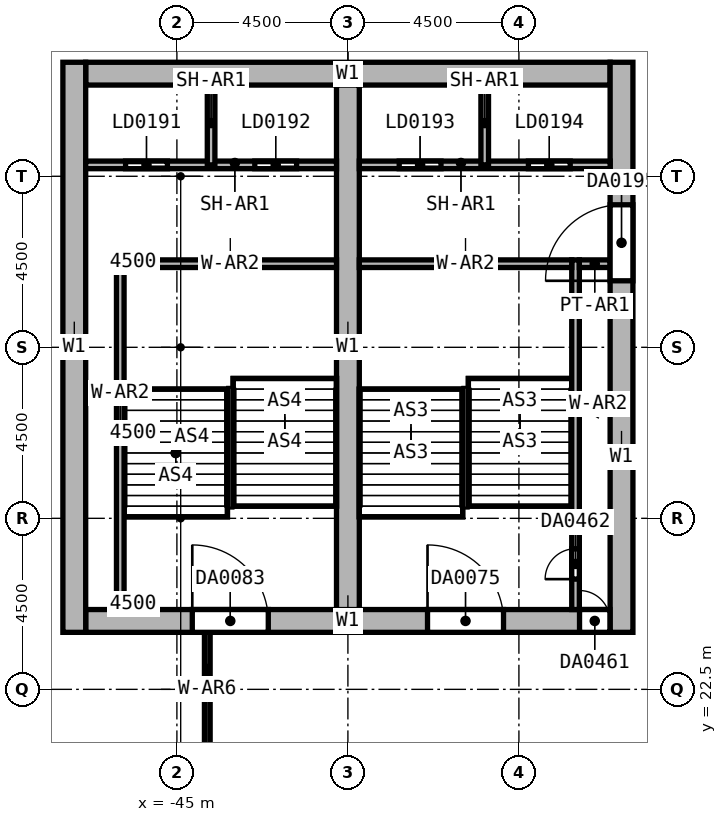
"""IFC4 building model, lengths in metres.
Left out: names, types, materials, properties, quantities, classifications, styles, units other than length and angle.
Written with IfcOpenShell. Run it as: python <this file> out.ifc"""

import sys

from ifc_helpers import new_model, si_unit, direction, frame, frame_2d, origin, place, context, subcontext, project, spatial, rectangle, extrude, element, fill, save


model = new_model("IFC4")
c1 = context("Model", 3, precision=1e-05, world=origin(), true_north=direction((0.0, 1.0)))
c2 = subcontext(c1, "Body", "Model", "MODEL_VIEW")
j1 = project(units=[si_unit("LENGTHUNIT", "METRE"), si_unit("PLANEANGLEUNIT", "RADIAN")], contexts=[c1])
p1 = place(None, origin())
s1 = spatial("IfcSite", under=j1, at=p1, CompositionType="ELEMENT")
p2 = place(p1, origin())
s2 = spatial("IfcBuilding", under=s1, at=p2, CompositionType="ELEMENT")
p3 = place(p2, frame((0.0, 0.0, 44.0)))
s3 = spatial("IfcBuildingStorey", under=s2, at=p3, CompositionType="ELEMENT", Elevation=44.0)
p4 = place(p3, frame((-47.4, 38.7, 0.0), z_axis=(0.0, 0.0, 1.0), x_axis=(1.0, 0.0, 0.0)))
e1 = element("IfcWall", 1, at=p4, inside=s3, PredefinedType="SHEAR", context=c2, shape_type="SweptSolid", body=[
    extrude(rectangle(XDim=13.8, YDim=0.6, at=frame_2d((6.9, 0.0))), origin(), (0.0, 0.0, 1.0), 8.0),
])
p5 = place(p3, frame((-47.4, 24.3, 0.0), z_axis=(0.0, 0.0, 1.0), x_axis=(1.0, 0.0, 0.0)))
e2 = element("IfcWall", 2, at=p5, inside=s3, PredefinedType="SHEAR", context=c2, shape_type="SweptSolid", body=[
    extrude(rectangle(XDim=13.8, YDim=0.6, at=frame_2d((6.9, 0.0))), origin(), (0.0, 0.0, 1.0), 8.0),
])
p6 = place(p5, frame((8.995, 0.0, 0.0)))
e3 = element("IfcOpeningElement", 3, at=p6, cuts=e2, PredefinedType="OPENING", context=c2, shape_type="SweptSolid", body=[
    extrude(rectangle(XDim=2.0, YDim=2.4, at=frame_2d((1.0, 1.2))), frame((0.0, 0.3, 0.0), z_axis=(0.0, -1.0, 0.0), x_axis=(1.0, 0.0, 0.0)), (0.0, 0.0, 1.0), 0.6),
])
p7 = place(p5, frame((2.805, 0.0, 0.0)))
e4 = element("IfcOpeningElement", 4, at=p7, cuts=e2, PredefinedType="OPENING", context=c2, shape_type="SweptSolid", body=[
    extrude(rectangle(XDim=2.0, YDim=2.4, at=frame_2d((1.0, 1.2))), frame((0.0, 0.3, 0.0), z_axis=(0.0, -1.0, 0.0), x_axis=(1.0, 0.0, 0.0)), (0.0, 0.0, 1.0), 0.6),
])
p8 = place(p5, frame((12.995, 0.0, 0.0)))
e5 = element("IfcOpeningElement", 5, at=p8, cuts=e2, PredefinedType="OPENING", context=c2, shape_type="SweptSolid", body=[
    extrude(rectangle(XDim=0.8, YDim=2.1, at=frame_2d((0.4, 1.05))), frame((0.0, 0.3, 0.0), z_axis=(0.0, -1.0, 0.0), x_axis=(1.0, 0.0, 0.0)), (0.0, 0.0, 1.0), 0.6),
])
p9 = place(p3, frame((-47.7, 24.0, 0.0), z_axis=(0.0, 0.0, 1.0), x_axis=(0.0, 1.0, 0.0)))
e6 = element("IfcWall", 6, at=p9, inside=s3, PredefinedType="SHEAR", context=c2, shape_type="SweptSolid", body=[
    extrude(rectangle(XDim=15.0, YDim=0.6, at=frame_2d((7.5, 0.0))), origin(), (0.0, 0.0, 1.0), 8.0),
])
p10 = place(p3, frame((-33.3, 24.0, 0.0), z_axis=(0.0, 0.0, 1.0), x_axis=(0.0, 1.0, 0.0)))
e7 = element("IfcWall", 7, at=p10, inside=s3, PredefinedType="SHEAR", context=c2, shape_type="SweptSolid", body=[
    extrude(rectangle(XDim=15.0, YDim=0.6, at=frame_2d((7.5, 0.0))), origin(), (0.0, 0.0, 1.0), 8.0),
])
p11 = place(p10, frame((9.25, 0.0, 0.0)))
e8 = element("IfcOpeningElement", 8, at=p11, cuts=e7, PredefinedType="OPENING", context=c2, shape_type="SweptSolid", body=[
    extrude(rectangle(XDim=2.0, YDim=2.4, at=frame_2d((1.0, 1.2))), frame((0.0, 0.3, 0.0), z_axis=(0.0, -1.0, 0.0), x_axis=(1.0, 0.0, 0.0)), (0.0, 0.0, 1.0), 0.6),
])
p12 = place(p3, frame((-40.5, 24.6, 0.0), z_axis=(0.0, 0.0, 1.0), x_axis=(0.0, 1.0, 0.0)))
e9 = element("IfcWall", 9, at=p12, inside=s3, PredefinedType="SHEAR", context=c2, shape_type="SweptSolid", body=[
    extrude(rectangle(XDim=13.8, YDim=0.6, at=frame_2d((6.9, 0.0))), origin(), (0.0, 0.0, 1.0), 8.0),
])
p13 = place(p3, frame((-34.51, 24.6, 0.0), z_axis=(0.0, 0.0, 1.0), x_axis=(0.0, 1.0, 0.0)))
e10 = element("IfcWall", 10, at=p13, inside=s3, PredefinedType="SOLIDWALL", context=c2, shape_type="SweptSolid", body=[
    extrude(rectangle(XDim=9.2, YDim=0.2, at=frame_2d((4.6, 0.0))), origin(), (0.0, 0.0, 1.0), 8.0),
])
p14 = place(p13, frame((0.8, 0.0, 0.0)))
e11 = element("IfcOpeningElement", 11, at=p14, cuts=e10, PredefinedType="OPENING", context=c2, shape_type="SweptSolid", body=[
    extrude(rectangle(XDim=0.8, YDim=2.1, at=frame_2d((0.4, 1.05))), frame((0.0, 0.1, 0.0), z_axis=(0.0, -1.0, 0.0), x_axis=(1.0, 0.0, 0.0)), (0.0, 0.0, 1.0), 0.2),
])
p15 = place(p3, frame((-40.2, 33.7, 0.0), z_axis=(0.0, 0.0, 1.0), x_axis=(1.0, 0.0, 0.0)))
e12 = element("IfcWall", 12, at=p15, inside=s3, PredefinedType="SOLIDWALL", context=c2, shape_type="SweptSolid", body=[
    extrude(rectangle(XDim=5.59, YDim=0.2, at=frame_2d((2.795, 0.0))), origin(), (0.0, 0.0, 1.0), 8.0),
])
p16 = place(p3, frame((-46.49, 24.6, 0.0), z_axis=(0.0, 0.0, 1.0), x_axis=(0.0, 1.0, 0.0)))
e13 = element("IfcWall", 13, at=p16, inside=s3, PredefinedType="SOLIDWALL", context=c2, shape_type="SweptSolid", body=[
    extrude(rectangle(XDim=9.2, YDim=0.2, at=frame_2d((4.6, 0.0))), origin(), (0.0, 0.0, 1.0), 8.0),
])
p17 = place(p3, frame((-46.39, 33.7, 0.0), z_axis=(0.0, 0.0, 1.0), x_axis=(1.0, 0.0, 0.0)))
e14 = element("IfcWall", 14, at=p17, inside=s3, PredefinedType="SOLIDWALL", context=c2, shape_type="SweptSolid", body=[
    extrude(rectangle(XDim=5.59, YDim=0.2, at=frame_2d((2.795, 0.0))), origin(), (0.0, 0.0, 1.0), 8.0),
])
p18 = place(p3, frame((-47.4, 36.3, 0.0), z_axis=(0.0, 0.0, 1.0), x_axis=(1.0, 0.0, 0.0)))
e15 = element("IfcWall", 15, at=p18, inside=s3, PredefinedType="SHEAR", context=c2, shape_type="SweptSolid", body=[
    extrude(rectangle(XDim=6.6, YDim=0.2, at=frame_2d((3.3, 0.0))), origin(), (0.0, 0.0, 1.0), 8.0),
])
p19 = place(p18, frame((1.05, 0.0, 0.0)))
e16 = element("IfcOpeningElement", 16, at=p19, cuts=e15, PredefinedType="OPENING", context=c2, shape_type="SweptSolid", body=[
    extrude(rectangle(XDim=1.1, YDim=2.4, at=frame_2d((0.55, 1.2))), frame((0.0, 0.1, 0.0), z_axis=(0.0, -1.0, 0.0), x_axis=(1.0, 0.0, 0.0)), (0.0, 0.0, 1.0), 0.2),
])
p20 = place(p18, frame((4.45, 0.0, 0.0)))
e17 = element("IfcOpeningElement", 17, at=p20, cuts=e15, PredefinedType="OPENING", context=c2, shape_type="SweptSolid", body=[
    extrude(rectangle(XDim=1.1, YDim=2.4, at=frame_2d((0.55, 1.2))), frame((0.0, 0.1, 0.0), z_axis=(0.0, -1.0, 0.0), x_axis=(1.0, 0.0, 0.0)), (0.0, 0.0, 1.0), 0.2),
])
p21 = place(p3, frame((-40.2, 36.3, 0.0), z_axis=(0.0, 0.0, 1.0), x_axis=(1.0, 0.0, 0.0)))
e18 = element("IfcWall", 18, at=p21, inside=s3, PredefinedType="SHEAR", context=c2, shape_type="SweptSolid", body=[
    extrude(rectangle(XDim=6.6, YDim=0.2, at=frame_2d((3.3, 0.0))), origin(), (0.0, 0.0, 1.0), 8.0),
])
p22 = place(p21, frame((1.05, 0.0, 0.0)))
e19 = element("IfcOpeningElement", 19, at=p22, cuts=e18, PredefinedType="OPENING", context=c2, shape_type="SweptSolid", body=[
    extrude(rectangle(XDim=1.1, YDim=2.4, at=frame_2d((0.55, 1.2))), frame((0.0, 0.1, 0.0), z_axis=(0.0, -1.0, 0.0), x_axis=(1.0, 0.0, 0.0)), (0.0, 0.0, 1.0), 0.2),
])
p23 = place(p21, frame((4.45, 0.0, 0.0)))
e20 = element("IfcOpeningElement", 20, at=p23, cuts=e18, PredefinedType="OPENING", context=c2, shape_type="SweptSolid", body=[
    extrude(rectangle(XDim=1.1, YDim=2.4, at=frame_2d((0.55, 1.2))), frame((0.0, 0.1, 0.0), z_axis=(0.0, -1.0, 0.0), x_axis=(1.0, 0.0, 0.0)), (0.0, 0.0, 1.0), 0.2),
])
for number, where, z_axis, x_axis in (
    (21, (-36.9, 36.3, 0.0), (0.0, 0.0, 1.0), (0.0, 1.0, 0.0)),
    (22, (-44.1, 36.3, 0.0), (0.0, 0.0, 1.0), (0.0, 1.0, 0.0)),
):
    element("IfcWall", number, at=place(p3, frame(where, z_axis=z_axis, x_axis=x_axis)), inside=s3, PredefinedType="SHEAR", context=c2, shape_type="SweptSolid", body=[
        extrude(rectangle(XDim=2.1, YDim=0.2, at=frame_2d((1.05, 0.0))), origin(), (0.0, 0.0, 1.0), 8.0),
    ])
p24 = place(p3, frame((-34.41, 33.7, 0.0), z_axis=(0.0, 0.0, 1.0), x_axis=(1.0, 0.0, 0.0)))
e23 = element("IfcWall", 23, at=p24, inside=s3, PredefinedType="PARTITIONING", context=c2, shape_type="SweptSolid", body=[
    extrude(rectangle(XDim=0.81, YDim=0.2, at=frame_2d((0.405, 0.0))), origin(), (0.0, 0.0, 1.0), 8.0),
])
p25 = place(p3, frame((-44.2, 21.0, 0.0), z_axis=(0.0, 0.0, 1.0), x_axis=(0.0, 1.0, 0.0)))
e24 = element("IfcWall", 24, at=p25, inside=s3, PredefinedType="SOLIDWALL", context=c2, shape_type="SweptSolid", body=[
    extrude(rectangle(XDim=3.0, YDim=0.15, at=frame_2d((1.5, 0.0))), origin(), (0.0, 0.0, 1.0), 7.7),
])
p26 = place(p6, origin())
e25 = element("IfcDoor", 25, at=p26, inside=s3, OperationType="DOUBLE_DOOR_SINGLE_SWING", PredefinedType="DOOR", context=c2, shape_type="SweptSolid", body=[
    extrude(rectangle(XDim=2.0, YDim=2.4, at=frame_2d((1.0, 1.2))), frame((0.0, 0.025, 0.0), z_axis=(0.0, -1.0, 0.0), x_axis=(1.0, 0.0, 0.0)), (0.0, 0.0, 1.0), 0.05),
])
fill(e3, e25)
p27 = place(p7, origin())
e26 = element("IfcDoor", 26, at=p27, inside=s3, OperationType="DOUBLE_DOOR_SINGLE_SWING", PredefinedType="DOOR", context=c2, shape_type="SweptSolid", body=[
    extrude(rectangle(XDim=2.0, YDim=2.4, at=frame_2d((1.0, 1.2))), frame((0.0, 0.025, 0.0), z_axis=(0.0, -1.0, 0.0), x_axis=(1.0, 0.0, 0.0)), (0.0, 0.0, 1.0), 0.05),
])
fill(e4, e26)
p28 = place(p19, origin())
e27 = element("IfcDoor", 27, at=p28, inside=s3, OperationType="DOUBLE_DOOR_SLIDING", PredefinedType="DOOR", context=c2, shape_type="SweptSolid", body=[
    extrude(rectangle(XDim=1.1, YDim=2.4, at=frame_2d((0.55, 1.2))), frame((0.0, 0.025, 0.0), z_axis=(0.0, -1.0, 0.0), x_axis=(1.0, 0.0, 0.0)), (0.0, 0.0, 1.0), 0.05),
])
fill(e16, e27)
p29 = place(p20, origin())
e28 = element("IfcDoor", 28, at=p29, inside=s3, OperationType="DOUBLE_DOOR_SLIDING", PredefinedType="DOOR", context=c2, shape_type="SweptSolid", body=[
    extrude(rectangle(XDim=1.1, YDim=2.4, at=frame_2d((0.55, 1.2))), frame((0.0, 0.025, 0.0), z_axis=(0.0, -1.0, 0.0), x_axis=(1.0, 0.0, 0.0)), (0.0, 0.0, 1.0), 0.05),
])
fill(e17, e28)
p30 = place(p22, origin())
e29 = element("IfcDoor", 29, at=p30, inside=s3, OperationType="DOUBLE_DOOR_SLIDING", PredefinedType="DOOR", context=c2, shape_type="SweptSolid", body=[
    extrude(rectangle(XDim=1.1, YDim=2.4, at=frame_2d((0.55, 1.2))), frame((0.0, 0.025, 0.0), z_axis=(0.0, -1.0, 0.0), x_axis=(1.0, 0.0, 0.0)), (0.0, 0.0, 1.0), 0.05),
])
fill(e19, e29)
p31 = place(p23, origin())
e30 = element("IfcDoor", 30, at=p31, inside=s3, OperationType="DOUBLE_DOOR_SLIDING", PredefinedType="DOOR", context=c2, shape_type="SweptSolid", body=[
    extrude(rectangle(XDim=1.1, YDim=2.4, at=frame_2d((0.55, 1.2))), frame((0.0, 0.025, 0.0), z_axis=(0.0, -1.0, 0.0), x_axis=(1.0, 0.0, 0.0)), (0.0, 0.0, 1.0), 0.05),
])
fill(e20, e30)
p32 = place(p11, origin())
e31 = element("IfcDoor", 31, at=p32, inside=s3, OperationType="DOUBLE_DOOR_SINGLE_SWING", PredefinedType="DOOR", context=c2, shape_type="SweptSolid", body=[
    extrude(rectangle(XDim=2.0, YDim=2.4, at=frame_2d((1.0, 1.2))), frame((0.0, 0.025, 0.0), z_axis=(0.0, -1.0, 0.0), x_axis=(1.0, 0.0, 0.0)), (0.0, 0.0, 1.0), 0.05),
])
fill(e8, e31)
p33 = place(p8, origin())
e32 = element("IfcDoor", 32, at=p33, inside=s3, OperationType="SINGLE_SWING_LEFT", PredefinedType="DOOR", context=c2, shape_type="SweptSolid", body=[
    extrude(rectangle(XDim=0.8, YDim=2.1, at=frame_2d((0.4, 1.05))), frame((0.0, 0.025, 0.0), z_axis=(0.0, -1.0, 0.0), x_axis=(1.0, 0.0, 0.0)), (0.0, 0.0, 1.0), 0.05),
])
fill(e5, e32)
p34 = place(p14, origin())
e33 = element("IfcDoor", 33, at=p34, inside=s3, OperationType="SINGLE_SWING_LEFT", PredefinedType="DOOR", context=c2, shape_type="SweptSolid", body=[
    extrude(rectangle(XDim=0.8, YDim=2.1, at=frame_2d((0.4, 1.05))), frame((0.0, 0.025, 0.0), z_axis=(0.0, -1.0, 0.0), x_axis=(1.0, 0.0, 0.0)), (0.0, 0.0, 1.0), 0.05),
])
fill(e11, e33)
save(model, sys.argv[1])
